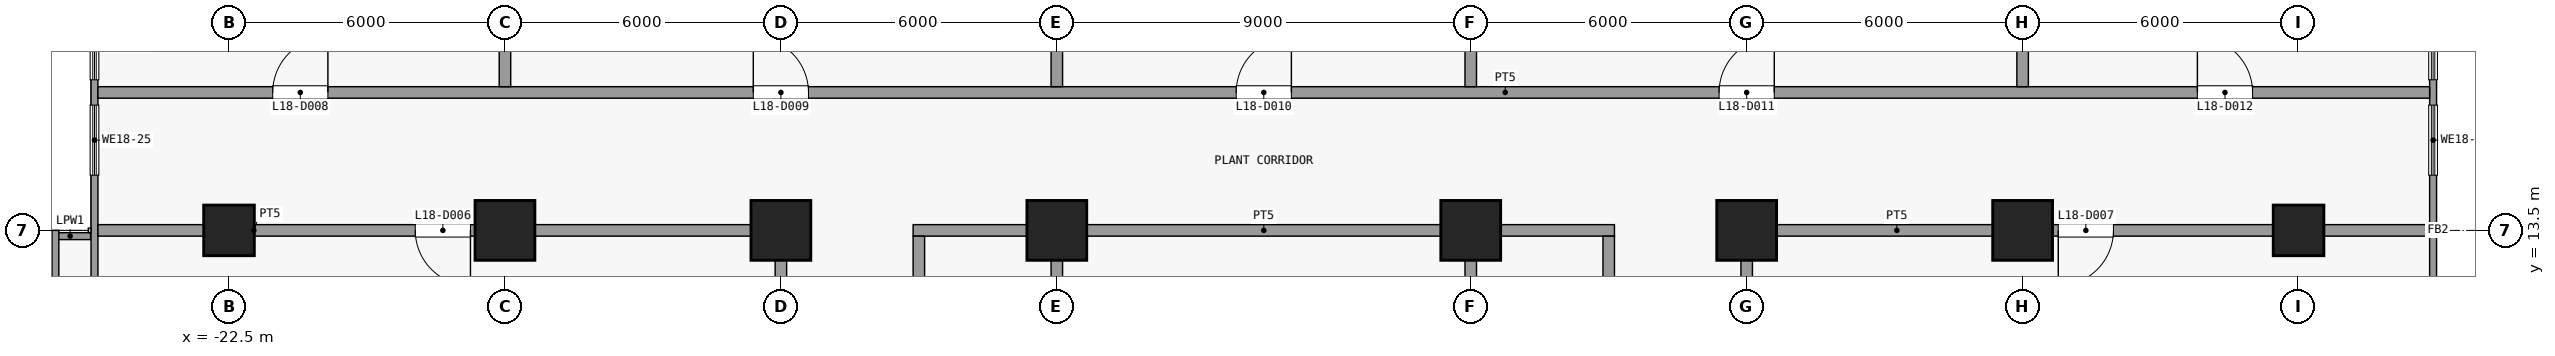
"""IFC4 building model, lengths in metres.
Left out: names, types, materials, properties, quantities, classifications, styles, units other than length and angle.
Written with IfcOpenShell. Run it as: python <this file> out.ifc"""

import sys

from ifc_helpers import new_model, si_unit, direction, frame, frame_2d, origin, origin_2d, place, context, subcontext, project, spatial, rectangle, extrude, element, fill, save


model = new_model("IFC4")
c1 = context("Model", 3, precision=1e-05, world=origin(), true_north=direction((0.0, 1.0)))
c2 = subcontext(c1, "Body", "Model", "MODEL_VIEW")
j1 = project(units=[si_unit("LENGTHUNIT", "METRE"), si_unit("PLANEANGLEUNIT", "RADIAN")], contexts=[c1])
p1 = place(None, origin())
s1 = spatial("IfcSite", under=j1, at=p1, CompositionType="ELEMENT")
p2 = place(p1, origin())
s2 = spatial("IfcBuilding", under=s1, at=p2, CompositionType="ELEMENT")
p3 = place(p2, frame((0.0, 0.0, 75.7)))
s3 = spatial("IfcBuildingStorey", under=s2, at=p3, CompositionType="ELEMENT", Elevation=75.7)
p4 = place(p3, frame((-22.5, 13.5, 0.0), z_axis=(0.0, 0.0, 1.0), x_axis=(1.0, 0.0, 0.0)))
e1 = element("IfcColumn", 1, at=p4, inside=s3, PredefinedType="COLUMN", context=c2, shape_type="SweptSolid", body=[
    extrude(rectangle(XDim=1.1, YDim=1.1, at=origin_2d()), origin(), (0.0, 0.0, 1.0), 5.4),
])
for number, where, z_axis, x_axis in (
    (2, (-16.5, 13.5, 0.0), (0.0, 0.0, 1.0), (1.0, 0.0, 0.0)),
    (3, (-10.5, 13.5, 0.0), (0.0, 0.0, 1.0), (1.0, 0.0, 0.0)),
    (4, (-4.5, 13.5, 0.0), (0.0, 0.0, 1.0), (1.0, 0.0, 0.0)),
    (5, (4.5, 13.5, 0.0), (0.0, 0.0, 1.0), (1.0, 0.0, 0.0)),
    (6, (10.5, 13.5, 0.0), (0.0, 0.0, 1.0), (1.0, 0.0, 0.0)),
    (7, (16.5, 13.5, 0.0), (0.0, 0.0, 1.0), (1.0, 0.0, 0.0)),
):
    element("IfcColumn", number, at=place(p3, frame(where, z_axis=z_axis, x_axis=x_axis)), inside=s3, PredefinedType="COLUMN", context=c2, shape_type="SweptSolid", body=[
        extrude(rectangle(XDim=1.3, YDim=1.3, at=origin_2d()), origin(), (0.0, 0.0, 1.0), 5.4),
    ])
p5 = place(p3, frame((22.5, 13.5, 0.0), z_axis=(0.0, 0.0, 1.0), x_axis=(1.0, 0.0, 0.0)))
e8 = element("IfcColumn", 8, at=p5, inside=s3, PredefinedType="COLUMN", context=c2, shape_type="SweptSolid", body=[
    extrude(rectangle(XDim=1.1, YDim=1.1, at=origin_2d()), origin(), (0.0, 0.0, 1.0), 5.4),
])
p6 = place(p3, frame((25.425, 25.35, 0.0), z_axis=(0.0, 0.0, 1.0), x_axis=(0.0, -1.0, 0.0)))
e9 = element("IfcWall", 9, at=p6, inside=s3, PredefinedType="SOLIDWALL", context=c2, shape_type="SweptSolid", body=[
    extrude(rectangle(XDim=47.7, YDim=0.15, at=frame_2d((23.85, 0.0))), origin(), (0.0, 0.0, 1.0), 5.0),
])
p7 = place(p6, frame((41.475, 0.0, 1.2)))
e10 = element("IfcOpeningElement", 10, at=p7, cuts=e9, PredefinedType="OPENING", context=c2, shape_type="SweptSolid", body=[
    extrude(rectangle(XDim=3.6, YDim=3.0, at=frame_2d((1.8, 1.5))), frame((0.0, 0.085, 0.0), z_axis=(0.0, -1.0, 0.0), x_axis=(1.0, 0.0, 0.0)), (0.0, 0.0, 1.0), 0.17),
])
p8 = place(p6, frame((33.525, 0.0, 1.2)))
e11 = element("IfcOpeningElement", 11, at=p8, cuts=e9, PredefinedType="OPENING", context=c2, shape_type="SweptSolid", body=[
    extrude(rectangle(XDim=2.625, YDim=3.0, at=frame_2d((1.312, 1.5))), frame((0.0, 0.085, 0.0), z_axis=(0.0, -1.0, 0.0), x_axis=(1.0, 0.0, 0.0)), (0.0, 0.0, 1.0), 0.17),
])
p9 = place(p6, frame((25.05, 0.0, 1.2)))
e12 = element("IfcOpeningElement", 12, at=p9, cuts=e9, PredefinedType="OPENING", context=c2, shape_type="SweptSolid", body=[
    extrude(rectangle(XDim=3.6, YDim=3.0, at=frame_2d((1.8, 1.5))), frame((0.0, 0.085, 0.0), z_axis=(0.0, -1.0, 0.0), x_axis=(1.0, 0.0, 0.0)), (0.0, 0.0, 1.0), 0.17),
])
p10 = place(p6, frame((19.05, 0.0, 1.2)))
e13 = element("IfcOpeningElement", 13, at=p10, cuts=e9, PredefinedType="OPENING", context=c2, shape_type="SweptSolid", body=[
    extrude(rectangle(XDim=3.6, YDim=3.0, at=frame_2d((1.8, 1.5))), frame((0.0, 0.085, 0.0), z_axis=(0.0, -1.0, 0.0), x_axis=(1.0, 0.0, 0.0)), (0.0, 0.0, 1.0), 0.17),
])
p11 = place(p6, frame((13.05, 0.0, 1.2)))
e14 = element("IfcOpeningElement", 14, at=p11, cuts=e9, PredefinedType="OPENING", context=c2, shape_type="SweptSolid", body=[
    extrude(rectangle(XDim=3.6, YDim=3.0, at=frame_2d((1.8, 1.5))), frame((0.0, 0.085, 0.0), z_axis=(0.0, -1.0, 0.0), x_axis=(1.0, 0.0, 0.0)), (0.0, 0.0, 1.0), 0.17),
])
p12 = place(p6, frame((9.125, 0.0, 1.2)))
e15 = element("IfcOpeningElement", 15, at=p12, cuts=e9, PredefinedType="OPENING", context=c2, shape_type="SweptSolid", body=[
    extrude(rectangle(XDim=1.525, YDim=3.0, at=frame_2d((0.762, 1.5))), frame((0.0, 0.085, 0.0), z_axis=(0.0, -1.0, 0.0), x_axis=(1.0, 0.0, 0.0)), (0.0, 0.0, 1.0), 0.17),
])
p13 = place(p6, frame((7.05, 0.0, 1.2)))
e16 = element("IfcOpeningElement", 16, at=p13, cuts=e9, PredefinedType="OPENING", context=c2, shape_type="SweptSolid", body=[
    extrude(rectangle(XDim=1.525, YDim=3.0, at=frame_2d((0.762, 1.5))), frame((0.0, 0.085, 0.0), z_axis=(0.0, -1.0, 0.0), x_axis=(1.0, 0.0, 0.0)), (0.0, 0.0, 1.0), 0.17),
])
p14 = place(p6, frame((1.125, 0.0, 1.2)))
e17 = element("IfcOpeningElement", 17, at=p14, cuts=e9, PredefinedType="OPENING", context=c2, shape_type="SweptSolid", body=[
    extrude(rectangle(XDim=3.6, YDim=3.0, at=frame_2d((1.8, 1.5))), frame((0.0, 0.085, 0.0), z_axis=(0.0, -1.0, 0.0), x_axis=(1.0, 0.0, 0.0)), (0.0, 0.0, 1.0), 0.17),
])
p15 = place(p3, frame((-25.425, -22.35, 0.0), z_axis=(0.0, 0.0, 1.0), x_axis=(0.0, 1.0, 0.0)))
e18 = element("IfcWall", 18, at=p15, inside=s3, PredefinedType="SOLIDWALL", context=c2, shape_type="SweptSolid", body=[
    extrude(rectangle(XDim=47.7, YDim=0.15, at=frame_2d((23.85, 0.0))), origin(), (0.0, 0.0, 1.0), 5.2),
])
p16 = place(p15, frame((2.625, 0.0, 1.2)))
e19 = element("IfcOpeningElement", 19, at=p16, cuts=e18, PredefinedType="OPENING", context=c2, shape_type="SweptSolid", body=[
    extrude(rectangle(XDim=3.6, YDim=3.0, at=frame_2d((1.8, 1.5))), frame((0.0, 0.085, 0.0), z_axis=(0.0, -1.0, 0.0), x_axis=(1.0, 0.0, 0.0)), (0.0, 0.0, 1.0), 0.17),
])
p17 = place(p15, frame((11.55, 0.0, 1.2)))
e20 = element("IfcOpeningElement", 20, at=p17, cuts=e18, PredefinedType="OPENING", context=c2, shape_type="SweptSolid", body=[
    extrude(rectangle(XDim=2.625, YDim=3.0, at=frame_2d((1.312, 1.5))), frame((0.0, 0.085, 0.0), z_axis=(0.0, -1.0, 0.0), x_axis=(1.0, 0.0, 0.0)), (0.0, 0.0, 1.0), 0.17),
])
p18 = place(p15, frame((19.05, 0.0, 1.2)))
e21 = element("IfcOpeningElement", 21, at=p18, cuts=e18, PredefinedType="OPENING", context=c2, shape_type="SweptSolid", body=[
    extrude(rectangle(XDim=3.6, YDim=3.0, at=frame_2d((1.8, 1.5))), frame((0.0, 0.085, 0.0), z_axis=(0.0, -1.0, 0.0), x_axis=(1.0, 0.0, 0.0)), (0.0, 0.0, 1.0), 0.17),
])
p19 = place(p15, frame((25.05, 0.0, 1.2)))
e22 = element("IfcOpeningElement", 22, at=p19, cuts=e18, PredefinedType="OPENING", context=c2, shape_type="SweptSolid", body=[
    extrude(rectangle(XDim=3.6, YDim=3.0, at=frame_2d((1.8, 1.5))), frame((0.0, 0.085, 0.0), z_axis=(0.0, -1.0, 0.0), x_axis=(1.0, 0.0, 0.0)), (0.0, 0.0, 1.0), 0.17),
])
p20 = place(p15, frame((31.05, 0.0, 1.2)))
e23 = element("IfcOpeningElement", 23, at=p20, cuts=e18, PredefinedType="OPENING", context=c2, shape_type="SweptSolid", body=[
    extrude(rectangle(XDim=3.6, YDim=3.0, at=frame_2d((1.8, 1.5))), frame((0.0, 0.085, 0.0), z_axis=(0.0, -1.0, 0.0), x_axis=(1.0, 0.0, 0.0)), (0.0, 0.0, 1.0), 0.17),
])
p21 = place(p15, frame((37.05, 0.0, 1.2)))
e24 = element("IfcOpeningElement", 24, at=p21, cuts=e18, PredefinedType="OPENING", context=c2, shape_type="SweptSolid", body=[
    extrude(rectangle(XDim=1.525, YDim=3.0, at=frame_2d((0.762, 1.5))), frame((0.0, 0.085, 0.0), z_axis=(0.0, -1.0, 0.0), x_axis=(1.0, 0.0, 0.0)), (0.0, 0.0, 1.0), 0.17),
])
p22 = place(p15, frame((39.125, 0.0, 1.2)))
e25 = element("IfcOpeningElement", 25, at=p22, cuts=e18, PredefinedType="OPENING", context=c2, shape_type="SweptSolid", body=[
    extrude(rectangle(XDim=1.525, YDim=3.0, at=frame_2d((0.762, 1.5))), frame((0.0, 0.085, 0.0), z_axis=(0.0, -1.0, 0.0), x_axis=(1.0, 0.0, 0.0)), (0.0, 0.0, 1.0), 0.17),
])
p23 = place(p15, frame((42.975, 0.0, 1.2)))
e26 = element("IfcOpeningElement", 26, at=p23, cuts=e18, PredefinedType="OPENING", context=c2, shape_type="SweptSolid", body=[
    extrude(rectangle(XDim=3.6, YDim=3.0, at=frame_2d((1.8, 1.5))), frame((0.0, 0.085, 0.0), z_axis=(0.0, -1.0, 0.0), x_axis=(1.0, 0.0, 0.0)), (0.0, 0.0, 1.0), 0.17),
])
p24 = place(p3, frame((-26.4, 13.375, 0.0), z_axis=(0.0, 0.0, 1.0), x_axis=(1.0, 0.0, 0.0)))
e27 = element("IfcWall", 27, at=p24, inside=s3, PredefinedType="PARAPET", context=c2, shape_type="SweptSolid", body=[
    extrude(rectangle(XDim=0.89, YDim=0.15, at=frame_2d((0.445, 0.0))), origin(), (0.0, 0.0, 1.0), 1.15),
])
p25 = place(p3, frame((-26.275, 7.7, 0.0), z_axis=(0.0, 0.0, 1.0), x_axis=(0.0, 1.0, 0.0)))
e28 = element("IfcWall", 28, at=p25, inside=s3, PredefinedType="PARAPET", context=c2, shape_type="SweptSolid", body=[
    extrude(rectangle(XDim=5.8, YDim=0.15, at=frame_2d((2.9, 0.0))), origin(), (0.0, 0.0, 1.0), 1.15),
])
p26 = place(p3, frame((-25.35, 13.5, 0.0), z_axis=(0.0, 0.0, 1.0), x_axis=(1.0, 0.0, 0.0)))
e29 = element("IfcWall", 29, at=p26, inside=s3, PredefinedType="PARTITIONING", context=c2, shape_type="SweptSolid", body=[
    extrude(rectangle(XDim=14.975, YDim=0.25, at=frame_2d((7.488, 0.0))), origin(), (0.0, 0.0, 1.0), 5.0),
])
p27 = place(p26, frame((6.9, 0.0, 0.0)))
e30 = element("IfcOpeningElement", 30, at=p27, cuts=e29, PredefinedType="OPENING", context=c2, shape_type="SweptSolid", body=[
    extrude(rectangle(XDim=1.2, YDim=2.1, at=frame_2d((0.6, 1.05))), frame((0.0, 0.135, 0.0), z_axis=(0.0, -1.0, 0.0), x_axis=(1.0, 0.0, 0.0)), (0.0, 0.0, 1.0), 0.27),
])
p28 = place(p3, frame((-7.625, 13.5, 0.0), z_axis=(0.0, 0.0, 1.0), x_axis=(1.0, 0.0, 0.0)))
e31 = element("IfcWall", 31, at=p28, inside=s3, PredefinedType="PARTITIONING", context=c2, shape_type="SweptSolid", body=[
    extrude(rectangle(XDim=15.25, YDim=0.25, at=frame_2d((7.625, 0.0))), origin(), (0.0, 0.0, 1.0), 5.0),
])
p29 = place(p3, frame((10.375, 13.5, 0.0), z_axis=(0.0, 0.0, 1.0), x_axis=(1.0, 0.0, 0.0)))
e32 = element("IfcWall", 32, at=p29, inside=s3, PredefinedType="PARTITIONING", context=c2, shape_type="SweptSolid", body=[
    extrude(rectangle(XDim=14.975, YDim=0.25, at=frame_2d((7.488, 0.0))), origin(), (0.0, 0.0, 1.0), 5.0),
])
p30 = place(p29, frame((6.9, 0.0, 0.0)))
e33 = element("IfcOpeningElement", 33, at=p30, cuts=e32, PredefinedType="OPENING", context=c2, shape_type="SweptSolid", body=[
    extrude(rectangle(XDim=1.2, YDim=2.1, at=frame_2d((0.6, 1.05))), frame((0.0, 0.135, 0.0), z_axis=(0.0, -1.0, 0.0), x_axis=(1.0, 0.0, 0.0)), (0.0, 0.0, 1.0), 0.27),
])
p31 = place(p3, frame((-25.35, 16.5, 0.0), z_axis=(0.0, 0.0, 1.0), x_axis=(1.0, 0.0, 0.0)))
e34 = element("IfcWall", 34, at=p31, inside=s3, PredefinedType="PARTITIONING", context=c2, shape_type="SweptSolid", body=[
    extrude(rectangle(XDim=50.7, YDim=0.25, at=frame_2d((25.35, 0.0))), origin(), (0.0, 0.0, 1.0), 5.0),
])
p32 = place(p31, frame((3.8, 0.0, 0.0)))
e35 = element("IfcOpeningElement", 35, at=p32, cuts=e34, PredefinedType="OPENING", context=c2, shape_type="SweptSolid", body=[
    extrude(rectangle(XDim=1.2, YDim=2.1, at=frame_2d((0.6, 1.05))), frame((0.0, 0.135, 0.0), z_axis=(0.0, -1.0, 0.0), x_axis=(1.0, 0.0, 0.0)), (0.0, 0.0, 1.0), 0.27),
])
p33 = place(p31, frame((14.25, 0.0, 0.0)))
e36 = element("IfcOpeningElement", 36, at=p33, cuts=e34, PredefinedType="OPENING", context=c2, shape_type="SweptSolid", body=[
    extrude(rectangle(XDim=1.2, YDim=2.1, at=frame_2d((0.6, 1.05))), frame((0.0, 0.135, 0.0), z_axis=(0.0, -1.0, 0.0), x_axis=(1.0, 0.0, 0.0)), (0.0, 0.0, 1.0), 0.27),
])
p34 = place(p31, frame((24.75, 0.0, 0.0)))
e37 = element("IfcOpeningElement", 37, at=p34, cuts=e34, PredefinedType="OPENING", context=c2, shape_type="SweptSolid", body=[
    extrude(rectangle(XDim=1.2, YDim=2.1, at=frame_2d((0.6, 1.05))), frame((0.0, 0.135, 0.0), z_axis=(0.0, -1.0, 0.0), x_axis=(1.0, 0.0, 0.0)), (0.0, 0.0, 1.0), 0.27),
])
p35 = place(p31, frame((35.25, 0.0, 0.0)))
e38 = element("IfcOpeningElement", 38, at=p35, cuts=e34, PredefinedType="OPENING", context=c2, shape_type="SweptSolid", body=[
    extrude(rectangle(XDim=1.2, YDim=2.1, at=frame_2d((0.6, 1.05))), frame((0.0, 0.135, 0.0), z_axis=(0.0, -1.0, 0.0), x_axis=(1.0, 0.0, 0.0)), (0.0, 0.0, 1.0), 0.27),
])
p36 = place(p31, frame((45.65, 0.0, 0.0)))
e39 = element("IfcOpeningElement", 39, at=p36, cuts=e34, PredefinedType="OPENING", context=c2, shape_type="SweptSolid", body=[
    extrude(rectangle(XDim=1.2, YDim=2.1, at=frame_2d((0.6, 1.05))), frame((0.0, 0.135, 0.0), z_axis=(0.0, -1.0, 0.0), x_axis=(1.0, 0.0, 0.0)), (0.0, 0.0, 1.0), 0.27),
])
p37 = place(p3, frame((-16.5, 16.625, 0.0), z_axis=(0.0, 0.0, 1.0), x_axis=(0.0, 1.0, 0.0)))
e40 = element("IfcWall", 40, at=p37, inside=s3, PredefinedType="PARTITIONING", context=c2, shape_type="SweptSolid", body=[
    extrude(rectangle(XDim=11.725, YDim=0.25, at=frame_2d((5.863, 0.0))), origin(), (0.0, 0.0, 1.0), 5.0),
])
p38 = place(p3, frame((-10.5, -4.375, 0.0), z_axis=(0.0, 0.0, 1.0), x_axis=(0.0, 1.0, 0.0)))
e41 = element("IfcWall", 41, at=p38, inside=s3, PredefinedType="PARTITIONING", context=c2, shape_type="SweptSolid", body=[
    extrude(rectangle(XDim=17.75, YDim=0.25, at=frame_2d((8.875, 0.0))), origin(), (0.0, 0.0, 1.0), 5.0),
])
p39 = place(p3, frame((-7.5, -4.375, 0.0), z_axis=(0.0, 0.0, 1.0), x_axis=(0.0, 1.0, 0.0)))
e42 = element("IfcWall", 42, at=p39, inside=s3, PredefinedType="PARTITIONING", context=c2, shape_type="SweptSolid", body=[
    extrude(rectangle(XDim=17.75, YDim=0.25, at=frame_2d((8.875, 0.0))), origin(), (0.0, 0.0, 1.0), 5.0),
])
p40 = place(p39, frame((8.3, 0.0, 0.0)))
e43 = element("IfcOpeningElement", 43, at=p40, cuts=e42, PredefinedType="OPENING", context=c2, shape_type="SweptSolid", body=[
    extrude(rectangle(XDim=1.2, YDim=2.1, at=frame_2d((0.6, 1.05))), frame((0.0, 0.135, 0.0), z_axis=(0.0, -1.0, 0.0), x_axis=(1.0, 0.0, 0.0)), (0.0, 0.0, 1.0), 0.27),
])
p41 = place(p3, frame((-4.5, -4.375, 0.0), z_axis=(0.0, 0.0, 1.0), x_axis=(0.0, 1.0, 0.0)))
e44 = element("IfcWall", 44, at=p41, inside=s3, PredefinedType="PARTITIONING", context=c2, shape_type="SweptSolid", body=[
    extrude(rectangle(XDim=17.75, YDim=0.25, at=frame_2d((8.875, 0.0))), origin(), (0.0, 0.0, 1.0), 5.0),
])
p42 = place(p3, frame((-4.5, 16.625, 0.0), z_axis=(0.0, 0.0, 1.0), x_axis=(0.0, 1.0, 0.0)))
e45 = element("IfcWall", 45, at=p42, inside=s3, PredefinedType="PARTITIONING", context=c2, shape_type="SweptSolid", body=[
    extrude(rectangle(XDim=11.725, YDim=0.25, at=frame_2d((5.863, 0.0))), origin(), (0.0, 0.0, 1.0), 5.0),
])
p43 = place(p3, frame((4.5, -4.375, 0.0), z_axis=(0.0, 0.0, 1.0), x_axis=(0.0, 1.0, 0.0)))
e46 = element("IfcWall", 46, at=p43, inside=s3, PredefinedType="PARTITIONING", context=c2, shape_type="SweptSolid", body=[
    extrude(rectangle(XDim=17.75, YDim=0.25, at=frame_2d((8.875, 0.0))), origin(), (0.0, 0.0, 1.0), 5.0),
])
p44 = place(p3, frame((4.5, 16.625, 0.0), z_axis=(0.0, 0.0, 1.0), x_axis=(0.0, 1.0, 0.0)))
e47 = element("IfcWall", 47, at=p44, inside=s3, PredefinedType="PARTITIONING", context=c2, shape_type="SweptSolid", body=[
    extrude(rectangle(XDim=11.725, YDim=0.25, at=frame_2d((5.863, 0.0))), origin(), (0.0, 0.0, 1.0), 5.0),
])
p45 = place(p3, frame((7.5, -4.375, 0.0), z_axis=(0.0, 0.0, 1.0), x_axis=(0.0, 1.0, 0.0)))
e48 = element("IfcWall", 48, at=p45, inside=s3, PredefinedType="PARTITIONING", context=c2, shape_type="SweptSolid", body=[
    extrude(rectangle(XDim=17.75, YDim=0.25, at=frame_2d((8.875, 0.0))), origin(), (0.0, 0.0, 1.0), 5.0),
])
p46 = place(p45, frame((8.3, 0.0, 0.0)))
e49 = element("IfcOpeningElement", 49, at=p46, cuts=e48, PredefinedType="OPENING", context=c2, shape_type="SweptSolid", body=[
    extrude(rectangle(XDim=1.2, YDim=2.1, at=frame_2d((0.6, 1.05))), frame((0.0, 0.135, 0.0), z_axis=(0.0, -1.0, 0.0), x_axis=(1.0, 0.0, 0.0)), (0.0, 0.0, 1.0), 0.27),
])
p47 = place(p3, frame((10.5, -4.375, 0.0), z_axis=(0.0, 0.0, 1.0), x_axis=(0.0, 1.0, 0.0)))
e50 = element("IfcWall", 50, at=p47, inside=s3, PredefinedType="PARTITIONING", context=c2, shape_type="SweptSolid", body=[
    extrude(rectangle(XDim=17.75, YDim=0.25, at=frame_2d((8.875, 0.0))), origin(), (0.0, 0.0, 1.0), 5.0),
])
p48 = place(p3, frame((16.5, 16.625, 0.0), z_axis=(0.0, 0.0, 1.0), x_axis=(0.0, 1.0, 0.0)))
e51 = element("IfcWall", 51, at=p48, inside=s3, PredefinedType="PARTITIONING", context=c2, shape_type="SweptSolid", body=[
    extrude(rectangle(XDim=11.725, YDim=0.25, at=frame_2d((5.863, 0.0))), origin(), (0.0, 0.0, 1.0), 5.0),
])
p49 = place(p12, origin())
e52 = element("IfcWindow", 52, at=p49, inside=s3, PartitioningType="SINGLE_PANEL", PredefinedType="WINDOW", context=c2, shape_type="SweptSolid", body=[
    extrude(rectangle(XDim=1.525, YDim=3.0, at=frame_2d((0.762, 1.5))), frame((0.0, 0.03, 0.0), z_axis=(0.0, -1.0, 0.0), x_axis=(1.0, 0.0, 0.0)), (0.0, 0.0, 1.0), 0.06),
])
fill(e15, e52)
p50 = place(p13, origin())
e53 = element("IfcWindow", 53, at=p50, inside=s3, PartitioningType="SINGLE_PANEL", PredefinedType="WINDOW", context=c2, shape_type="SweptSolid", body=[
    extrude(rectangle(XDim=1.525, YDim=3.0, at=frame_2d((0.762, 1.5))), frame((0.0, 0.03, 0.0), z_axis=(0.0, -1.0, 0.0), x_axis=(1.0, 0.0, 0.0)), (0.0, 0.0, 1.0), 0.06),
])
fill(e16, e53)
p51 = place(p21, origin())
e54 = element("IfcWindow", 54, at=p51, inside=s3, PartitioningType="SINGLE_PANEL", PredefinedType="WINDOW", context=c2, shape_type="SweptSolid", body=[
    extrude(rectangle(XDim=1.525, YDim=3.0, at=frame_2d((0.762, 1.5))), frame((0.0, 0.03, 0.0), z_axis=(0.0, -1.0, 0.0), x_axis=(1.0, 0.0, 0.0)), (0.0, 0.0, 1.0), 0.06),
])
fill(e24, e54)
p52 = place(p22, origin())
e55 = element("IfcWindow", 55, at=p52, inside=s3, PartitioningType="SINGLE_PANEL", PredefinedType="WINDOW", context=c2, shape_type="SweptSolid", body=[
    extrude(rectangle(XDim=1.525, YDim=3.0, at=frame_2d((0.762, 1.5))), frame((0.0, 0.03, 0.0), z_axis=(0.0, -1.0, 0.0), x_axis=(1.0, 0.0, 0.0)), (0.0, 0.0, 1.0), 0.06),
])
fill(e25, e55)
p53 = place(p27, origin())
e56 = element("IfcDoor", 56, at=p53, inside=s3, OperationType="SINGLE_SWING_RIGHT", PredefinedType="DOOR", context=c2, shape_type="SweptSolid", body=[
    extrude(rectangle(XDim=1.2, YDim=2.1, at=frame_2d((0.6, 1.05))), frame((0.0, 0.025, 0.0), z_axis=(0.0, -1.0, 0.0), x_axis=(1.0, 0.0, 0.0)), (0.0, 0.0, 1.0), 0.05),
])
fill(e30, e56)
p54 = place(p30, origin())
e57 = element("IfcDoor", 57, at=p54, inside=s3, OperationType="SINGLE_SWING_LEFT", PredefinedType="DOOR", context=c2, shape_type="SweptSolid", body=[
    extrude(rectangle(XDim=1.2, YDim=2.1, at=frame_2d((0.6, 1.05))), frame((0.0, 0.025, 0.0), z_axis=(0.0, -1.0, 0.0), x_axis=(1.0, 0.0, 0.0)), (0.0, 0.0, 1.0), 0.05),
])
fill(e33, e57)
p55 = place(p32, origin())
e58 = element("IfcDoor", 58, at=p55, inside=s3, OperationType="SINGLE_SWING_LEFT", PredefinedType="DOOR", context=c2, shape_type="SweptSolid", body=[
    extrude(rectangle(XDim=1.2, YDim=2.1, at=frame_2d((0.6, 1.05))), frame((0.0, 0.025, 0.0), z_axis=(0.0, -1.0, 0.0), x_axis=(1.0, 0.0, 0.0)), (0.0, 0.0, 1.0), 0.05),
])
fill(e35, e58)
p56 = place(p33, origin())
e59 = element("IfcDoor", 59, at=p56, inside=s3, OperationType="SINGLE_SWING_RIGHT", PredefinedType="DOOR", context=c2, shape_type="SweptSolid", body=[
    extrude(rectangle(XDim=1.2, YDim=2.1, at=frame_2d((0.6, 1.05))), frame((0.0, 0.025, 0.0), z_axis=(0.0, -1.0, 0.0), x_axis=(1.0, 0.0, 0.0)), (0.0, 0.0, 1.0), 0.05),
])
fill(e36, e59)
p57 = place(p34, origin())
e60 = element("IfcDoor", 60, at=p57, inside=s3, OperationType="SINGLE_SWING_LEFT", PredefinedType="DOOR", context=c2, shape_type="SweptSolid", body=[
    extrude(rectangle(XDim=1.2, YDim=2.1, at=frame_2d((0.6, 1.05))), frame((0.0, 0.025, 0.0), z_axis=(0.0, -1.0, 0.0), x_axis=(1.0, 0.0, 0.0)), (0.0, 0.0, 1.0), 0.05),
])
fill(e37, e60)
p58 = place(p35, origin())
e61 = element("IfcDoor", 61, at=p58, inside=s3, OperationType="SINGLE_SWING_LEFT", PredefinedType="DOOR", context=c2, shape_type="SweptSolid", body=[
    extrude(rectangle(XDim=1.2, YDim=2.1, at=frame_2d((0.6, 1.05))), frame((0.0, 0.025, 0.0), z_axis=(0.0, -1.0, 0.0), x_axis=(1.0, 0.0, 0.0)), (0.0, 0.0, 1.0), 0.05),
])
fill(e38, e61)
p59 = place(p36, origin())
e62 = element("IfcDoor", 62, at=p59, inside=s3, OperationType="SINGLE_SWING_RIGHT", PredefinedType="DOOR", context=c2, shape_type="SweptSolid", body=[
    extrude(rectangle(XDim=1.2, YDim=2.1, at=frame_2d((0.6, 1.05))), frame((0.0, 0.025, 0.0), z_axis=(0.0, -1.0, 0.0), x_axis=(1.0, 0.0, 0.0)), (0.0, 0.0, 1.0), 0.05),
])
fill(e39, e62)
save(model, sys.argv[1])
